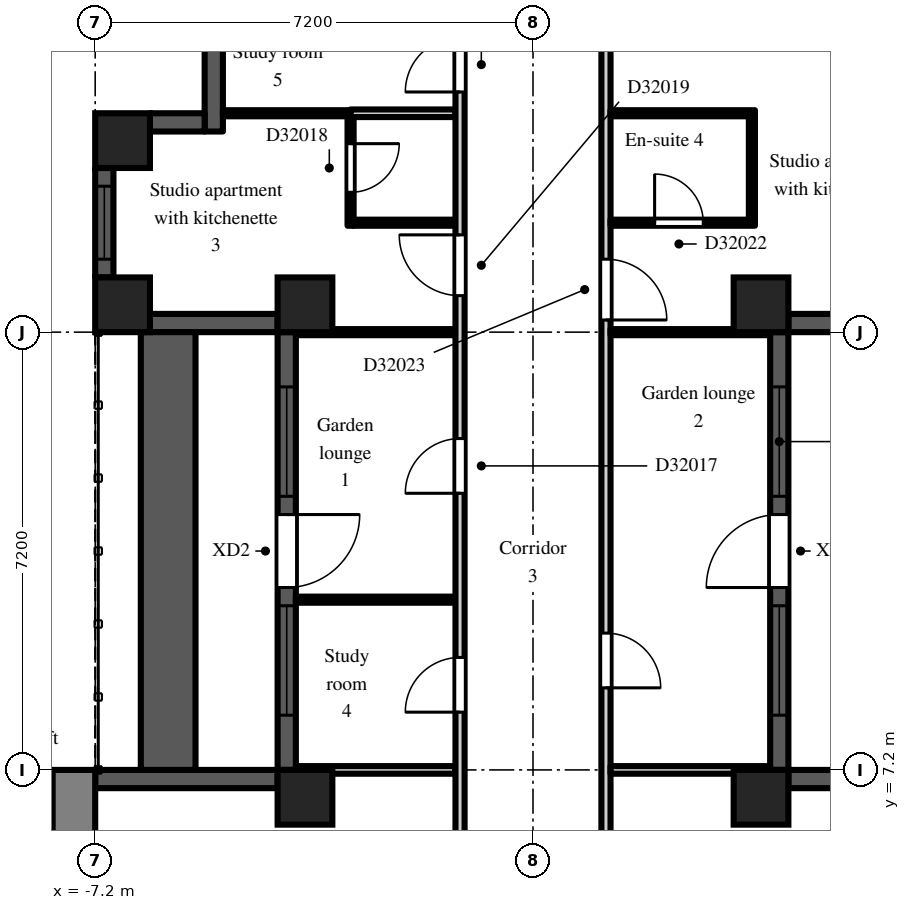
"""IFC4 building model, lengths in metres.
Left out: names, types, materials, properties, quantities, classifications, styles, units other than length and angle.
Written with IfcOpenShell. Run it as: python <this file> out.ifc"""

import sys

from ifc_helpers import new_model, si_unit, direction, frame, frame_2d, origin, origin_2d, place, context, subcontext, project, spatial, rectangle, extrude, element, fill, save


model = new_model("IFC4")
c1 = context("Model", 3, precision=1e-05, world=origin(), true_north=direction((0.0, 1.0)))
c2 = subcontext(c1, "Body", "Model", "MODEL_VIEW")
j1 = project(units=[si_unit("LENGTHUNIT", "METRE"), si_unit("PLANEANGLEUNIT", "RADIAN")], contexts=[c1])
p1 = place(None, origin())
s1 = spatial("IfcSite", under=j1, at=p1, CompositionType="ELEMENT")
p2 = place(p1, origin())
s2 = spatial("IfcBuilding", under=s1, at=p2, CompositionType="ELEMENT")
p3 = place(p2, frame((0.0, 0.0, 225.9)))
s3 = spatial("IfcBuildingStorey", under=s2, at=p3, CompositionType="ELEMENT", Elevation=225.9)
for number, where, z_axis, x_axis in (
    (1, (-6.75, 14.85, 0.0), (0.0, 0.0, 1.0), (1.0, 0.0, 0.0)),
    (2, (-6.75, 17.55, 0.0), (0.0, 0.0, 1.0), (1.0, 0.0, 0.0)),
    (3, (-3.75, 6.75, 0.0), (0.0, 0.0, 1.0), (1.0, 0.0, 0.0)),
    (4, (-3.75, 14.85, 0.0), (0.0, 0.0, 1.0), (1.0, 0.0, 0.0)),
    (5, (3.75, 6.75, 0.0), (0.0, 0.0, 1.0), (1.0, 0.0, 0.0)),
    (6, (3.75, 14.85, 0.0), (0.0, 0.0, 1.0), (1.0, 0.0, 0.0)),
):
    element("IfcColumn", number, at=place(p3, frame(where, z_axis=z_axis, x_axis=x_axis)), inside=s3, PredefinedType="COLUMN", context=c2, shape_type="SweptSolid", body=[
        extrude(rectangle(XDim=0.9, YDim=0.9, at=origin_2d()), origin(), (0.0, 0.0, 1.0), 3.0),
    ])
p4 = place(p3, frame((7.2, 7.05, 0.0), z_axis=(0.0, 0.0, 1.0), x_axis=(-1.0, 0.0, 0.0)))
e7 = element("IfcWall", 7, at=p4, inside=s3, PredefinedType="SOLIDWALL", context=c2, shape_type="SweptSolid", body=[
    extrude(rectangle(XDim=3.0, YDim=0.3, at=frame_2d((1.5, 0.0))), origin(), (0.0, 0.0, 1.0), 2.3),
])
p5 = place(p3, frame((4.05, 7.2, 0.0), z_axis=(0.0, 0.0, 1.0), x_axis=(0.0, 1.0, 0.0)))
e8 = element("IfcWall", 8, at=p5, inside=s3, PredefinedType="SOLIDWALL", context=c2, shape_type="SweptSolid", body=[
    extrude(rectangle(XDim=7.2, YDim=0.3, at=frame_2d((3.6, 0.0))), origin(), (0.0, 0.0, 1.0), 2.3),
])
p6 = place(p5, frame((3.0, 0.0, 0.0)))
e9 = element("IfcOpeningElement", 9, at=p6, cuts=e8, PredefinedType="OPENING", context=c2, shape_type="SweptSolid", body=[
    extrude(rectangle(XDim=1.2, YDim=2.05, at=frame_2d((0.6, 1.025))), frame((0.0, 0.16, 0.0), z_axis=(0.0, -1.0, 0.0), x_axis=(1.0, 0.0, 0.0)), (0.0, 0.0, 1.0), 0.32),
])
p7 = place(p5, frame((0.9, 0.0, 0.2)))
e10 = element("IfcOpeningElement", 10, at=p7, cuts=e8, PredefinedType="OPENING", context=c2, shape_type="SweptSolid", body=[
    extrude(rectangle(XDim=1.8, YDim=1.85, at=frame_2d((0.9, 0.925))), frame((0.0, 0.16, 0.0), z_axis=(0.0, -1.0, 0.0), x_axis=(1.0, 0.0, 0.0)), (0.0, 0.0, 1.0), 0.32),
])
p8 = place(p5, frame((4.5, 0.0, 0.2)))
e11 = element("IfcOpeningElement", 11, at=p8, cuts=e8, PredefinedType="OPENING", context=c2, shape_type="SweptSolid", body=[
    extrude(rectangle(XDim=1.8, YDim=1.85, at=frame_2d((0.9, 0.925))), frame((0.0, 0.16, 0.0), z_axis=(0.0, -1.0, 0.0), x_axis=(1.0, 0.0, 0.0)), (0.0, 0.0, 1.0), 0.32),
])
p9 = place(p3, frame((4.2, 14.55, 0.0), z_axis=(0.0, 0.0, 1.0), x_axis=(1.0, 0.0, 0.0)))
e12 = element("IfcWall", 12, at=p9, inside=s3, PredefinedType="SOLIDWALL", context=c2, shape_type="SweptSolid", body=[
    extrude(rectangle(XDim=2.1, YDim=0.3, at=frame_2d((1.05, 0.0))), origin(), (0.0, 0.0, 1.0), 2.3),
])
p10 = place(p3, frame((-5.25, 19.5, 0.0), z_axis=(0.0, 0.0, 1.0), x_axis=(0.0, -1.0, 0.0)))
e13 = element("IfcWall", 13, at=p10, inside=s3, PredefinedType="SOLIDWALL", context=c2, shape_type="SweptSolid", body=[
    extrude(rectangle(XDim=1.8, YDim=0.3, at=frame_2d((0.9, 0.0))), origin(), (0.0, 0.0, 1.0), 2.6),
])
p11 = place(p3, frame((-5.4, 17.85, 0.0), z_axis=(0.0, 0.0, 1.0), x_axis=(-1.0, 0.0, 0.0)))
e14 = element("IfcWall", 14, at=p11, inside=s3, PredefinedType="SOLIDWALL", context=c2, shape_type="SweptSolid", body=[
    extrude(rectangle(XDim=0.9, YDim=0.3, at=frame_2d((0.45, 0.0))), origin(), (0.0, 0.0, 1.0), 2.6),
])
p12 = place(p3, frame((-7.05, 17.1, 0.0), z_axis=(0.0, 0.0, 1.0), x_axis=(0.0, -1.0, 0.0)))
e15 = element("IfcWall", 15, at=p12, inside=s3, PredefinedType="SOLIDWALL", context=c2, shape_type="SweptSolid", body=[
    extrude(rectangle(XDim=1.8, YDim=0.3, at=frame_2d((0.9, 0.0))), origin(), (0.0, 0.0, 1.0), 2.3),
])
p13 = place(p12, frame((0.3, 0.0, 0.2)))
e16 = element("IfcOpeningElement", 16, at=p13, cuts=e15, PredefinedType="OPENING", context=c2, shape_type="SweptSolid", body=[
    extrude(rectangle(XDim=1.2, YDim=1.85, at=frame_2d((0.6, 0.925))), frame((0.0, 0.16, 0.0), z_axis=(0.0, -1.0, 0.0), x_axis=(1.0, 0.0, 0.0)), (0.0, 0.0, 1.0), 0.32),
])
p14 = place(p3, frame((-6.3, 14.55, 0.0), z_axis=(0.0, 0.0, 1.0), x_axis=(1.0, 0.0, 0.0)))
e17 = element("IfcWall", 17, at=p14, inside=s3, PredefinedType="SOLIDWALL", context=c2, shape_type="SweptSolid", body=[
    extrude(rectangle(XDim=2.1, YDim=0.3, at=frame_2d((1.05, 0.0))), origin(), (0.0, 0.0, 1.0), 2.3),
])
p15 = place(p3, frame((-4.05, 14.4, 0.0), z_axis=(0.0, 0.0, 1.0), x_axis=(0.0, -1.0, 0.0)))
e18 = element("IfcWall", 18, at=p15, inside=s3, PredefinedType="SOLIDWALL", context=c2, shape_type="SweptSolid", body=[
    extrude(rectangle(XDim=7.2, YDim=0.3, at=frame_2d((3.6, 0.0))), origin(), (0.0, 0.0, 1.0), 2.3),
])
p16 = place(p15, frame((3.0, 0.0, 0.0)))
e19 = element("IfcOpeningElement", 19, at=p16, cuts=e18, PredefinedType="OPENING", context=c2, shape_type="SweptSolid", body=[
    extrude(rectangle(XDim=1.2, YDim=2.05, at=frame_2d((0.6, 1.025))), frame((0.0, 0.16, 0.0), z_axis=(0.0, -1.0, 0.0), x_axis=(1.0, 0.0, 0.0)), (0.0, 0.0, 1.0), 0.32),
])
p17 = place(p15, frame((0.9, 0.0, 0.2)))
e20 = element("IfcOpeningElement", 20, at=p17, cuts=e18, PredefinedType="OPENING", context=c2, shape_type="SweptSolid", body=[
    extrude(rectangle(XDim=1.8, YDim=1.85, at=frame_2d((0.9, 0.925))), frame((0.0, 0.16, 0.0), z_axis=(0.0, -1.0, 0.0), x_axis=(1.0, 0.0, 0.0)), (0.0, 0.0, 1.0), 0.32),
])
p18 = place(p15, frame((4.5, 0.0, 0.2)))
e21 = element("IfcOpeningElement", 21, at=p18, cuts=e18, PredefinedType="OPENING", context=c2, shape_type="SweptSolid", body=[
    extrude(rectangle(XDim=1.8, YDim=1.85, at=frame_2d((0.9, 0.925))), frame((0.0, 0.16, 0.0), z_axis=(0.0, -1.0, 0.0), x_axis=(1.0, 0.0, 0.0)), (0.0, 0.0, 1.0), 0.32),
])
p19 = place(p3, frame((-4.2, 7.05, 0.0), z_axis=(0.0, 0.0, 1.0), x_axis=(-1.0, 0.0, 0.0)))
e22 = element("IfcWall", 22, at=p19, inside=s3, PredefinedType="SOLIDWALL", context=c2, shape_type="SweptSolid", body=[
    extrude(rectangle(XDim=3.0, YDim=0.3, at=frame_2d((1.5, 0.0))), origin(), (0.0, 0.0, 1.0), 2.3),
])
p20 = place(p3, frame((-6.0, 7.2, 0.0), z_axis=(0.0, 0.0, 1.0), x_axis=(0.0, 1.0, 0.0)))
e23 = element("IfcWall", 23, at=p20, inside=s3, PredefinedType="PARAPET", context=c2, shape_type="SweptSolid", body=[
    extrude(rectangle(XDim=7.2, YDim=0.9, at=frame_2d((3.6, 0.0))), origin(), (0.0, 0.0, 1.0), 0.8),
])
p21 = place(p3, frame((-7.55, -7.2, 0.0), z_axis=(0.0, 0.0, 1.0), x_axis=(0.0, 1.0, 0.0)))
e24 = element("IfcWall", 24, at=p21, inside=s3, PredefinedType="SHEAR", context=c2, shape_type="SweptSolid", body=[
    extrude(rectangle(XDim=14.4, YDim=0.7, at=frame_2d((7.2, 0.0))), origin(), (0.0, 0.0, 1.0), 2.6),
])
p22 = place(p21, frame((6.0, 0.0, 0.0)))
e25 = element("IfcOpeningElement", 25, at=p22, cuts=e24, PredefinedType="OPENING", context=c2, shape_type="SweptSolid", body=[
    extrude(rectangle(XDim=2.4, YDim=2.2, at=frame_2d((1.2, 1.1))), frame((0.0, 0.36, 0.0), z_axis=(0.0, -1.0, 0.0), x_axis=(1.0, 0.0, 0.0)), (0.0, 0.0, 1.0), 0.72),
])
p23 = place(p3, frame((-5.1, 18.0, 0.0), z_axis=(0.0, 0.0, 1.0), x_axis=(1.0, 0.0, 0.0)))
e26 = element("IfcWall", 26, at=p23, inside=s3, PredefinedType="PARTITIONING", context=c2, shape_type="SweptSolid", body=[
    extrude(rectangle(XDim=2.1, YDim=0.1, at=frame_2d((1.05, 0.0))), origin(), (0.0, 0.0, 1.0), 2.6),
])
p24 = place(p3, frame((-3.9, 7.2, 0.0), z_axis=(0.0, 0.0, 1.0), x_axis=(1.0, 0.0, 0.0)))
e27 = element("IfcWall", 27, at=p24, inside=s3, PredefinedType="PARTITIONING", context=c2, shape_type="SweptSolid", body=[
    extrude(rectangle(XDim=2.625, YDim=0.125, at=frame_2d((1.312, 0.0))), origin(), (0.0, 0.0, 1.0), 2.6),
])
for number, where, z_axis, x_axis in (
    (28, (-3.9, 10.0, 0.0), (0.0, 0.0, 1.0), (1.0, 0.0, 0.0)),
    (29, (-3.9, 14.4, 0.0), (0.0, 0.0, 1.0), (1.0, 0.0, 0.0)),
):
    element("IfcWall", number, at=place(p3, frame(where, z_axis=z_axis, x_axis=x_axis)), inside=s3, PredefinedType="PARTITIONING", context=c2, shape_type="SweptSolid", body=[
        extrude(rectangle(XDim=2.625, YDim=0.1, at=frame_2d((1.312, 0.0))), origin(), (0.0, 0.0, 1.0), 2.6),
    ])
p25 = place(p3, frame((-3.0, 16.15, 0.0), z_axis=(0.0, 0.0, 1.0), x_axis=(0.0, 1.0, 0.0)))
e30 = element("IfcWall", 30, at=p25, inside=s3, PredefinedType="PARTITIONING", context=c2, shape_type="SweptSolid", body=[
    extrude(rectangle(XDim=1.788, YDim=0.1, at=frame_2d((0.894, 0.0))), origin(), (0.0, 0.0, 1.0), 2.6),
])
p26 = place(p25, frame((0.55, 0.0, 0.0)))
e31 = element("IfcOpeningElement", 31, at=p26, cuts=e30, PredefinedType="OPENING", context=c2, shape_type="SweptSolid", body=[
    extrude(rectangle(XDim=0.8, YDim=2.1, at=frame_2d((0.4, 1.05))), frame((0.0, 0.06, 0.0), z_axis=(0.0, -1.0, 0.0), x_axis=(1.0, 0.0, 0.0)), (0.0, 0.0, 1.0), 0.12),
])
p27 = place(p3, frame((-2.95, 16.2, 0.0), z_axis=(0.0, 0.0, 1.0), x_axis=(1.0, 0.0, 0.0)))
e32 = element("IfcWall", 32, at=p27, inside=s3, PredefinedType="PARTITIONING", context=c2, shape_type="SweptSolid", body=[
    extrude(rectangle(XDim=1.675, YDim=0.1, at=frame_2d((0.837, 0.0))), origin(), (0.0, 0.0, 1.0), 2.6),
])
p28 = place(p3, frame((-3.0, 18.0, 0.0), z_axis=(0.0, 0.0, 1.0), x_axis=(1.0, 0.0, 0.0)))
e33 = element("IfcWall", 33, at=p28, inside=s3, PredefinedType="PARTITIONING", context=c2, shape_type="SweptSolid", body=[
    extrude(rectangle(XDim=1.725, YDim=0.125, at=frame_2d((0.863, 0.0))), origin(), (0.0, 0.0, 1.0), 2.6),
])
p29 = place(p3, frame((-1.2, 1.275, 0.0), z_axis=(0.0, 0.0, 1.0), x_axis=(0.0, 1.0, 0.0)))
e34 = element("IfcWall", 34, at=p29, inside=s3, PredefinedType="PARTITIONING", context=c2, shape_type="SweptSolid", body=[
    extrude(rectangle(XDim=18.25, YDim=0.15, at=frame_2d((9.125, 0.0))), origin(), (0.0, 0.0, 1.0), 2.6),
])
p30 = place(p29, frame((0.675, 0.0, 0.0)))
e35 = element("IfcOpeningElement", 35, at=p30, cuts=e34, PredefinedType="OPENING", context=c2, shape_type="SweptSolid", body=[
    extrude(rectangle(XDim=0.9, YDim=2.1, at=frame_2d((0.45, 1.05))), frame((0.0, 0.085, 0.0), z_axis=(0.0, -1.0, 0.0), x_axis=(1.0, 0.0, 0.0)), (0.0, 0.0, 1.0), 0.17),
])
p31 = place(p29, frame((3.675, 0.0, 0.0)))
e36 = element("IfcOpeningElement", 36, at=p31, cuts=e34, PredefinedType="OPENING", context=c2, shape_type="SweptSolid", body=[
    extrude(rectangle(XDim=0.9, YDim=2.1, at=frame_2d((0.45, 1.05))), frame((0.0, 0.085, 0.0), z_axis=(0.0, -1.0, 0.0), x_axis=(1.0, 0.0, 0.0)), (0.0, 0.0, 1.0), 0.17),
])
p32 = place(p29, frame((6.875, 0.0, 0.0)))
e37 = element("IfcOpeningElement", 37, at=p32, cuts=e34, PredefinedType="OPENING", context=c2, shape_type="SweptSolid", body=[
    extrude(rectangle(XDim=0.9, YDim=2.1, at=frame_2d((0.45, 1.05))), frame((0.0, 0.085, 0.0), z_axis=(0.0, -1.0, 0.0), x_axis=(1.0, 0.0, 0.0)), (0.0, 0.0, 1.0), 0.17),
])
p33 = place(p29, frame((10.475, 0.0, 0.0)))
e38 = element("IfcOpeningElement", 38, at=p33, cuts=e34, PredefinedType="OPENING", context=c2, shape_type="SweptSolid", body=[
    extrude(rectangle(XDim=0.9, YDim=2.1, at=frame_2d((0.45, 1.05))), frame((0.0, 0.085, 0.0), z_axis=(0.0, -1.0, 0.0), x_axis=(1.0, 0.0, 0.0)), (0.0, 0.0, 1.0), 0.17),
])
p34 = place(p29, frame((13.725, 0.0, 0.0)))
e39 = element("IfcOpeningElement", 39, at=p34, cuts=e34, PredefinedType="OPENING", context=c2, shape_type="SweptSolid", body=[
    extrude(rectangle(XDim=1.0, YDim=2.1, at=frame_2d((0.5, 1.05))), frame((0.0, 0.085, 0.0), z_axis=(0.0, -1.0, 0.0), x_axis=(1.0, 0.0, 0.0)), (0.0, 0.0, 1.0), 0.17),
])
p35 = place(p29, frame((17.075, 0.0, 0.0)))
e40 = element("IfcOpeningElement", 40, at=p35, cuts=e34, PredefinedType="OPENING", context=c2, shape_type="SweptSolid", body=[
    extrude(rectangle(XDim=0.9, YDim=2.1, at=frame_2d((0.45, 1.05))), frame((0.0, 0.085, 0.0), z_axis=(0.0, -1.0, 0.0), x_axis=(1.0, 0.0, 0.0)), (0.0, 0.0, 1.0), 0.17),
])
p36 = place(p3, frame((1.2, 1.125, 0.0), z_axis=(0.0, 0.0, 1.0), x_axis=(0.0, 1.0, 0.0)))
e41 = element("IfcWall", 41, at=p36, inside=s3, PredefinedType="PARTITIONING", context=c2, shape_type="SweptSolid", body=[
    extrude(rectangle(XDim=18.4, YDim=0.15, at=frame_2d((9.2, 0.0))), origin(), (0.0, 0.0, 1.0), 2.6),
])
p37 = place(p36, frame((2.625, 0.0, 0.0)))
e42 = element("IfcOpeningElement", 42, at=p37, cuts=e41, PredefinedType="OPENING", context=c2, shape_type="SweptSolid", body=[
    extrude(rectangle(XDim=0.9, YDim=2.1, at=frame_2d((0.45, 1.05))), frame((0.0, 0.085, 0.0), z_axis=(0.0, -1.0, 0.0), x_axis=(1.0, 0.0, 0.0)), (0.0, 0.0, 1.0), 0.17),
])
p38 = place(p36, frame((7.425, 0.0, 0.0)))
e43 = element("IfcOpeningElement", 43, at=p38, cuts=e41, PredefinedType="OPENING", context=c2, shape_type="SweptSolid", body=[
    extrude(rectangle(XDim=0.9, YDim=2.1, at=frame_2d((0.45, 1.05))), frame((0.0, 0.085, 0.0), z_axis=(0.0, -1.0, 0.0), x_axis=(1.0, 0.0, 0.0)), (0.0, 0.0, 1.0), 0.17),
])
p39 = place(p36, frame((13.475, 0.0, 0.0)))
e44 = element("IfcOpeningElement", 44, at=p39, cuts=e41, PredefinedType="OPENING", context=c2, shape_type="SweptSolid", body=[
    extrude(rectangle(XDim=1.0, YDim=2.1, at=frame_2d((0.5, 1.05))), frame((0.0, 0.085, 0.0), z_axis=(0.0, -1.0, 0.0), x_axis=(1.0, 0.0, 0.0)), (0.0, 0.0, 1.0), 0.17),
])
p40 = place(p3, frame((1.275, 7.2, 0.0), z_axis=(0.0, 0.0, 1.0), x_axis=(1.0, 0.0, 0.0)))
e45 = element("IfcWall", 45, at=p40, inside=s3, PredefinedType="PARTITIONING", context=c2, shape_type="SweptSolid", body=[
    extrude(rectangle(XDim=2.625, YDim=0.125, at=frame_2d((1.312, 0.0))), origin(), (0.0, 0.0, 1.0), 2.6),
])
p41 = place(p3, frame((1.275, 14.4, 0.0), z_axis=(0.0, 0.0, 1.0), x_axis=(1.0, 0.0, 0.0)))
e46 = element("IfcWall", 46, at=p41, inside=s3, PredefinedType="PARTITIONING", context=c2, shape_type="SweptSolid", body=[
    extrude(rectangle(XDim=2.625, YDim=0.1, at=frame_2d((1.312, 0.0))), origin(), (0.0, 0.0, 1.0), 2.6),
])
p42 = place(p3, frame((1.275, 16.2, 0.0), z_axis=(0.0, 0.0, 1.0), x_axis=(1.0, 0.0, 0.0)))
e47 = element("IfcWall", 47, at=p42, inside=s3, PredefinedType="PARTITIONING", context=c2, shape_type="SweptSolid", body=[
    extrude(rectangle(XDim=2.375, YDim=0.1, at=frame_2d((1.188, 0.0))), origin(), (0.0, 0.0, 1.0), 2.6),
])
p43 = place(p42, frame((0.725, 0.0, 0.0)))
e48 = element("IfcOpeningElement", 48, at=p43, cuts=e47, PredefinedType="OPENING", context=c2, shape_type="SweptSolid", body=[
    extrude(rectangle(XDim=0.8, YDim=2.1, at=frame_2d((0.4, 1.05))), frame((0.0, 0.06, 0.0), z_axis=(0.0, -1.0, 0.0), x_axis=(1.0, 0.0, 0.0)), (0.0, 0.0, 1.0), 0.12),
])
p44 = place(p3, frame((1.275, 18.0, 0.0), z_axis=(0.0, 0.0, 1.0), x_axis=(1.0, 0.0, 0.0)))
e49 = element("IfcWall", 49, at=p44, inside=s3, PredefinedType="PARTITIONING", context=c2, shape_type="SweptSolid", body=[
    extrude(rectangle(XDim=2.375, YDim=0.1, at=frame_2d((1.188, 0.0))), origin(), (0.0, 0.0, 1.0), 2.6),
])
p45 = place(p3, frame((3.6, 16.25, 0.0), z_axis=(0.0, 0.0, 1.0), x_axis=(0.0, 1.0, 0.0)))
e50 = element("IfcWall", 50, at=p45, inside=s3, PredefinedType="PARTITIONING", context=c2, shape_type="SweptSolid", body=[
    extrude(rectangle(XDim=1.7, YDim=0.1, at=frame_2d((0.85, 0.0))), origin(), (0.0, 0.0, 1.0), 2.6),
])
p46 = place(p6, origin())
e51 = element("IfcDoor", 51, at=p46, inside=s3, OperationType="SINGLE_SWING_LEFT", PredefinedType="DOOR", context=c2, shape_type="SweptSolid", body=[
    extrude(rectangle(XDim=1.2, YDim=2.05, at=frame_2d((0.6, 1.025))), frame((0.0, 0.025, 0.0), z_axis=(0.0, -1.0, 0.0), x_axis=(1.0, 0.0, 0.0)), (0.0, 0.0, 1.0), 0.05),
])
fill(e9, e51)
p47 = place(p7, origin())
e52 = element("IfcWindow", 52, at=p47, inside=s3, PartitioningType="SINGLE_PANEL", PredefinedType="WINDOW", context=c2, shape_type="SweptSolid", body=[
    extrude(rectangle(XDim=1.8, YDim=1.85, at=frame_2d((0.9, 0.925))), frame((0.0, 0.03, 0.0), z_axis=(0.0, -1.0, 0.0), x_axis=(1.0, 0.0, 0.0)), (0.0, 0.0, 1.0), 0.06),
])
fill(e10, e52)
p48 = place(p8, origin())
e53 = element("IfcWindow", 53, at=p48, inside=s3, PartitioningType="SINGLE_PANEL", PredefinedType="WINDOW", context=c2, shape_type="SweptSolid", body=[
    extrude(rectangle(XDim=1.8, YDim=1.85, at=frame_2d((0.9, 0.925))), frame((0.0, 0.03, 0.0), z_axis=(0.0, -1.0, 0.0), x_axis=(1.0, 0.0, 0.0)), (0.0, 0.0, 1.0), 0.06),
])
fill(e11, e53)
p49 = place(p13, origin())
e54 = element("IfcWindow", 54, at=p49, inside=s3, PartitioningType="SINGLE_PANEL", PredefinedType="WINDOW", context=c2, shape_type="SweptSolid", body=[
    extrude(rectangle(XDim=1.2, YDim=1.85, at=frame_2d((0.6, 0.925))), frame((0.0, 0.03, 0.0), z_axis=(0.0, -1.0, 0.0), x_axis=(1.0, 0.0, 0.0)), (0.0, 0.0, 1.0), 0.06),
])
fill(e16, e54)
p50 = place(p16, origin())
e55 = element("IfcDoor", 55, at=p50, inside=s3, OperationType="SINGLE_SWING_LEFT", PredefinedType="DOOR", context=c2, shape_type="SweptSolid", body=[
    extrude(rectangle(XDim=1.2, YDim=2.05, at=frame_2d((0.6, 1.025))), frame((0.0, 0.025, 0.0), z_axis=(0.0, -1.0, 0.0), x_axis=(1.0, 0.0, 0.0)), (0.0, 0.0, 1.0), 0.05),
])
fill(e19, e55)
p51 = place(p17, origin())
e56 = element("IfcWindow", 56, at=p51, inside=s3, PartitioningType="SINGLE_PANEL", PredefinedType="WINDOW", context=c2, shape_type="SweptSolid", body=[
    extrude(rectangle(XDim=1.8, YDim=1.85, at=frame_2d((0.9, 0.925))), frame((0.0, 0.03, 0.0), z_axis=(0.0, -1.0, 0.0), x_axis=(1.0, 0.0, 0.0)), (0.0, 0.0, 1.0), 0.06),
])
fill(e20, e56)
p52 = place(p18, origin())
e57 = element("IfcWindow", 57, at=p52, inside=s3, PartitioningType="SINGLE_PANEL", PredefinedType="WINDOW", context=c2, shape_type="SweptSolid", body=[
    extrude(rectangle(XDim=1.8, YDim=1.85, at=frame_2d((0.9, 0.925))), frame((0.0, 0.03, 0.0), z_axis=(0.0, -1.0, 0.0), x_axis=(1.0, 0.0, 0.0)), (0.0, 0.0, 1.0), 0.06),
])
fill(e21, e57)
p53 = place(p32, origin())
e58 = element("IfcDoor", 58, at=p53, inside=s3, OperationType="SINGLE_SWING_LEFT", PredefinedType="DOOR", context=c2, shape_type="SweptSolid", body=[
    extrude(rectangle(XDim=0.9, YDim=2.1, at=frame_2d((0.45, 1.05))), frame((0.0, 0.025, 0.0), z_axis=(0.0, -1.0, 0.0), x_axis=(1.0, 0.0, 0.0)), (0.0, 0.0, 1.0), 0.05),
])
fill(e37, e58)
p54 = place(p33, origin())
e59 = element("IfcDoor", 59, at=p54, inside=s3, OperationType="SINGLE_SWING_LEFT", PredefinedType="DOOR", context=c2, shape_type="SweptSolid", body=[
    extrude(rectangle(XDim=0.9, YDim=2.1, at=frame_2d((0.45, 1.05))), frame((0.0, 0.025, 0.0), z_axis=(0.0, -1.0, 0.0), x_axis=(1.0, 0.0, 0.0)), (0.0, 0.0, 1.0), 0.05),
])
fill(e38, e59)
p55 = place(p26, frame((0.8, 0.0, 0.0), z_axis=(0.0, 0.0, 1.0), x_axis=(-1.0, 0.0, 0.0)))
e60 = element("IfcDoor", 60, at=p55, inside=s3, OperationType="SINGLE_SWING_LEFT", PredefinedType="DOOR", context=c2, shape_type="SweptSolid", body=[
    extrude(rectangle(XDim=0.8, YDim=2.1, at=frame_2d((0.4, 1.05))), frame((0.0, 0.025, 0.0), z_axis=(0.0, -1.0, 0.0), x_axis=(1.0, 0.0, 0.0)), (0.0, 0.0, 1.0), 0.05),
])
fill(e31, e60)
p56 = place(p34, origin())
e61 = element("IfcDoor", 61, at=p56, inside=s3, OperationType="SINGLE_SWING_RIGHT", PredefinedType="DOOR", context=c2, shape_type="SweptSolid", body=[
    extrude(rectangle(XDim=1.0, YDim=2.1, at=frame_2d((0.5, 1.05))), frame((0.0, 0.025, 0.0), z_axis=(0.0, -1.0, 0.0), x_axis=(1.0, 0.0, 0.0)), (0.0, 0.0, 1.0), 0.05),
])
fill(e39, e61)
p57 = place(p35, origin())
e62 = element("IfcDoor", 62, at=p57, inside=s3, OperationType="SINGLE_SWING_LEFT", PredefinedType="DOOR", context=c2, shape_type="SweptSolid", body=[
    extrude(rectangle(XDim=0.9, YDim=2.1, at=frame_2d((0.45, 1.05))), frame((0.0, 0.025, 0.0), z_axis=(0.0, -1.0, 0.0), x_axis=(1.0, 0.0, 0.0)), (0.0, 0.0, 1.0), 0.05),
])
fill(e40, e62)
p58 = place(p38, frame((0.9, 0.0, 0.0), z_axis=(0.0, 0.0, 1.0), x_axis=(-1.0, 0.0, 0.0)))
e63 = element("IfcDoor", 63, at=p58, inside=s3, OperationType="SINGLE_SWING_RIGHT", PredefinedType="DOOR", context=c2, shape_type="SweptSolid", body=[
    extrude(rectangle(XDim=0.9, YDim=2.1, at=frame_2d((0.45, 1.05))), frame((0.0, 0.025, 0.0), z_axis=(0.0, -1.0, 0.0), x_axis=(1.0, 0.0, 0.0)), (0.0, 0.0, 1.0), 0.05),
])
fill(e43, e63)
p59 = place(p43, origin())
e64 = element("IfcDoor", 64, at=p59, inside=s3, OperationType="SINGLE_SWING_LEFT", PredefinedType="DOOR", context=c2, shape_type="SweptSolid", body=[
    extrude(rectangle(XDim=0.8, YDim=2.1, at=frame_2d((0.4, 1.05))), frame((0.0, 0.025, 0.0), z_axis=(0.0, -1.0, 0.0), x_axis=(1.0, 0.0, 0.0)), (0.0, 0.0, 1.0), 0.05),
])
fill(e48, e64)
p60 = place(p39, frame((1.0, 0.0, 0.0), z_axis=(0.0, 0.0, 1.0), x_axis=(-1.0, 0.0, 0.0)))
e65 = element("IfcDoor", 65, at=p60, inside=s3, OperationType="SINGLE_SWING_RIGHT", PredefinedType="DOOR", context=c2, shape_type="SweptSolid", body=[
    extrude(rectangle(XDim=1.0, YDim=2.1, at=frame_2d((0.5, 1.05))), frame((0.0, 0.025, 0.0), z_axis=(0.0, -1.0, 0.0), x_axis=(1.0, 0.0, 0.0)), (0.0, 0.0, 1.0), 0.05),
])
fill(e44, e65)
save(model, sys.argv[1])
